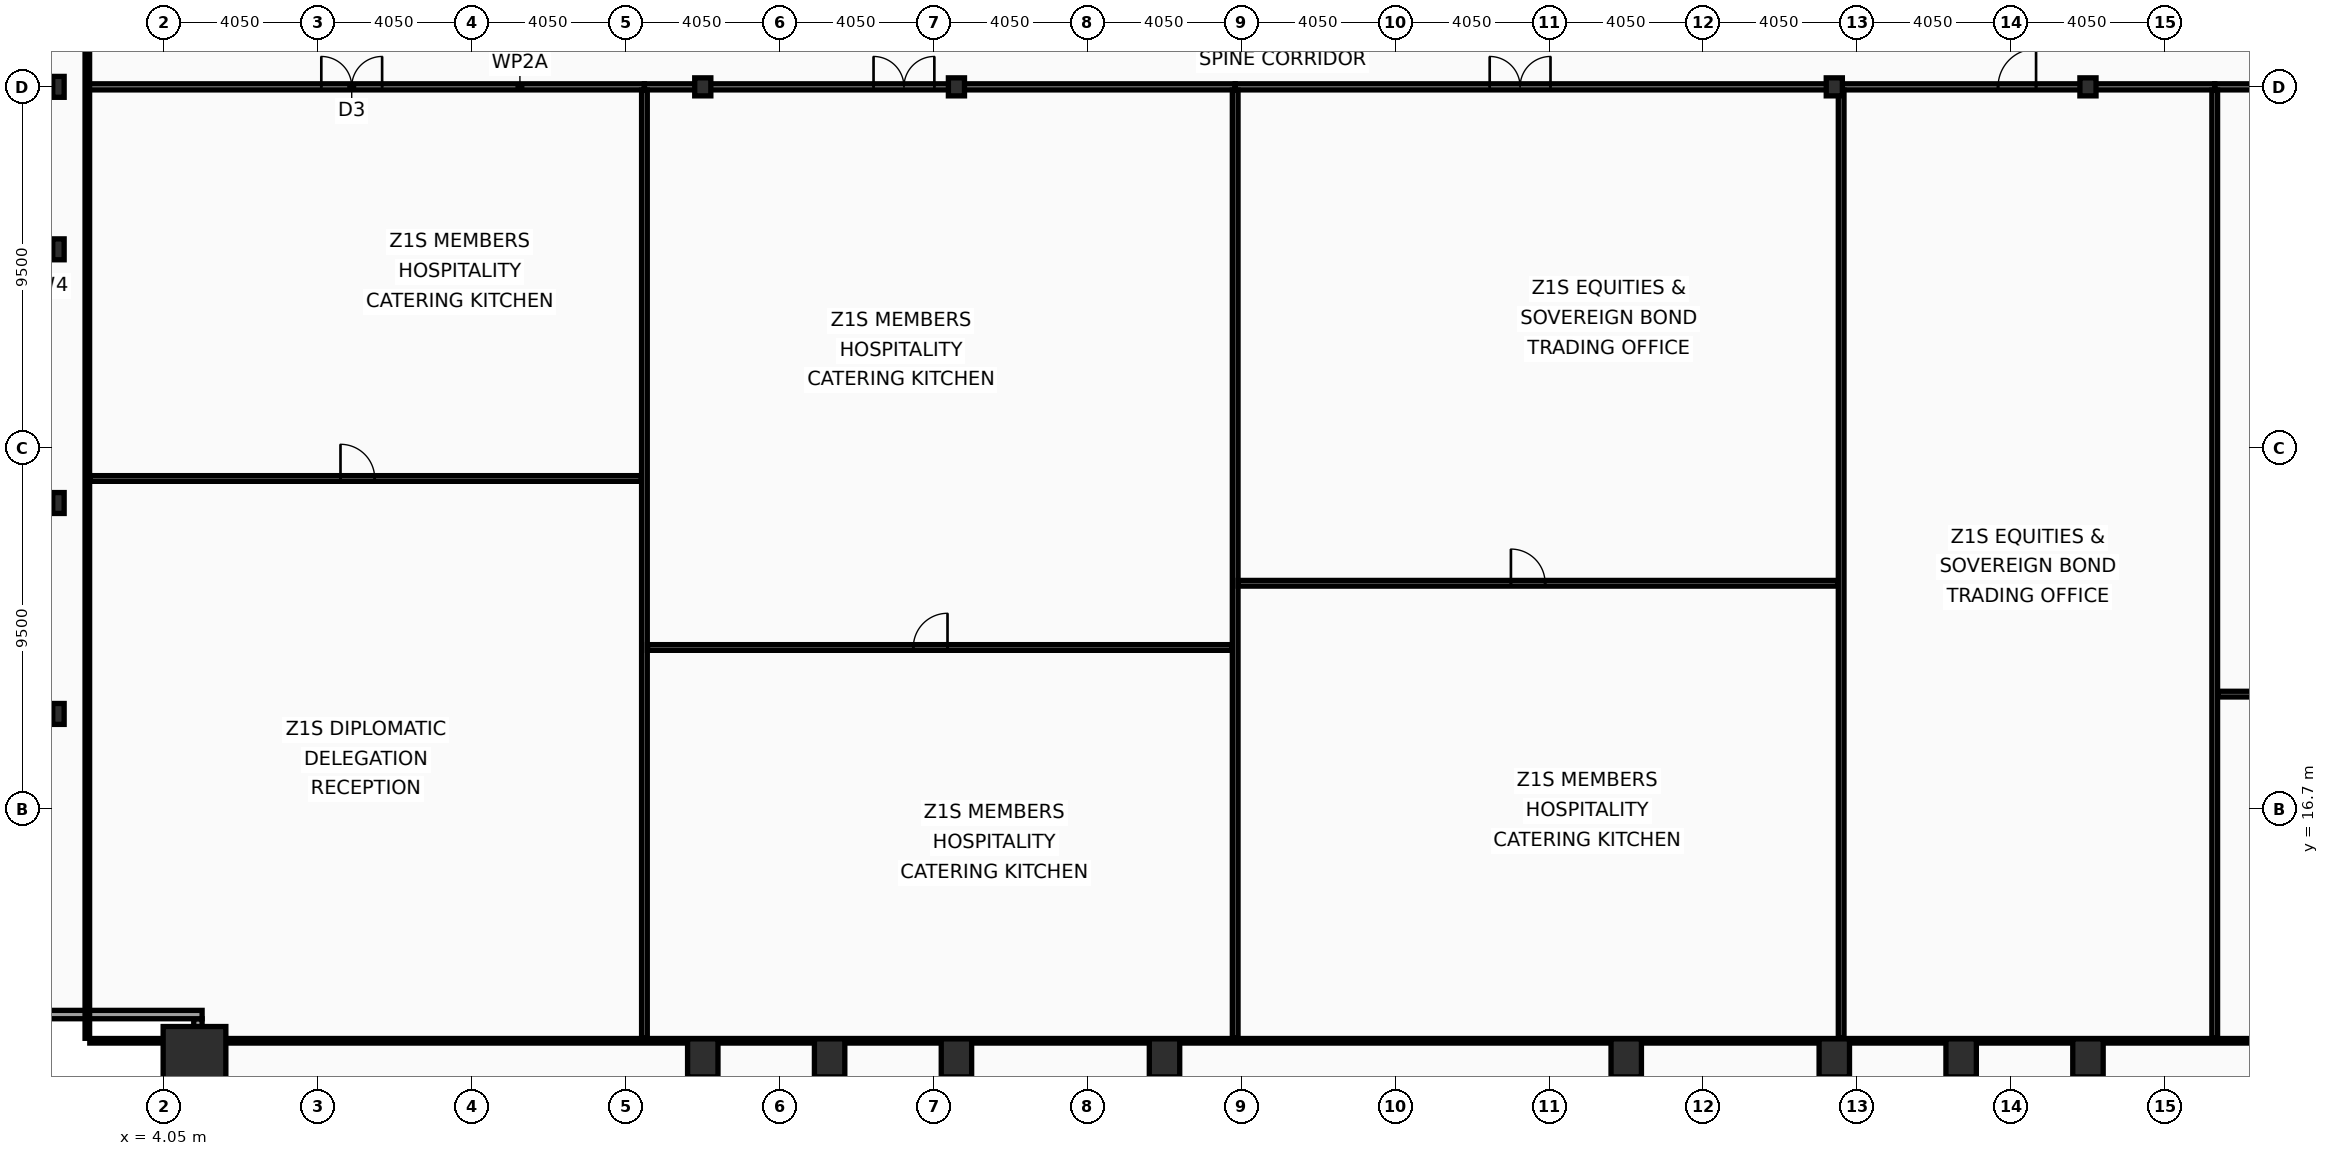
"""IFC4 building model, lengths in metres.
Left out: names, types, materials, properties, quantities, classifications, styles, units other than length and angle.
Written with IfcOpenShell. Run it as: python <this file> out.ifc"""

import sys

from ifc_helpers import new_model, si_unit, direction, frame, frame_2d, origin, origin_2d, place, context, subcontext, project, spatial, rectangle, hollow_rectangle, i_section, extrude, element, fill, save


model = new_model("IFC4")
c1 = context("Model", 3, precision=1e-05, world=origin(), true_north=direction((0.0, 1.0)))
c2 = subcontext(c1, "Body", "Model", "MODEL_VIEW")
j1 = project(units=[si_unit("LENGTHUNIT", "METRE"), si_unit("PLANEANGLEUNIT", "RADIAN")], contexts=[c1])
p1 = place(None, origin())
s1 = spatial("IfcSite", under=j1, at=p1, CompositionType="ELEMENT")
p2 = place(p1, origin())
s2 = spatial("IfcBuilding", under=s1, at=p2, CompositionType="ELEMENT")
p3 = place(p2, frame((0.0, 0.0, 77.8)))
s3 = spatial("IfcBuildingStorey", under=s2, at=p3, CompositionType="ELEMENT", Elevation=77.8)
p4 = place(p3, frame((4.85, 10.15, 0.0), z_axis=(0.0, 0.0, 1.0), x_axis=(1.0, 0.0, 0.0)))
e1 = element("IfcColumn", 1, at=p4, inside=s3, PredefinedType="COLUMN", context=c2, shape_type="SweptSolid", body=[
    extrude(hollow_rectangle(XDim=1.65, YDim=1.65, WallThickness=0.075, at=origin_2d()), origin(), (0.0, 0.0, 1.0), 4.0),
])
for number, where, z_axis, x_axis in (
    (2, (18.225, 10.15, 0.0), (0.0, 0.0, 1.0), (1.0, 0.0, 0.0)),
    (3, (21.562, 10.15, 0.0), (0.0, 0.0, 1.0), (1.0, 0.0, 0.0)),
    (4, (24.9, 10.15, 0.0), (0.0, 0.0, 1.0), (1.0, 0.0, 0.0)),
    (5, (30.375, 10.15, 0.0), (0.0, 0.0, 1.0), (1.0, 0.0, 0.0)),
    (6, (42.525, 10.15, 0.0), (0.0, 0.0, 1.0), (1.0, 0.0, 0.0)),
    (7, (48.0, 10.15, 0.0), (0.0, 0.0, 1.0), (1.0, 0.0, 0.0)),
    (8, (51.337, 10.15, 0.0), (0.0, 0.0, 1.0), (1.0, 0.0, 0.0)),
    (9, (54.675, 10.15, 0.0), (0.0, 0.0, 1.0), (1.0, 0.0, 0.0)),
):
    element("IfcColumn", number, at=place(p3, frame(where, z_axis=z_axis, x_axis=x_axis)), inside=s3, PredefinedType="COLUMN", context=c2, shape_type="SweptSolid", body=[
        extrude(hollow_rectangle(XDim=0.8, YDim=1.0, WallThickness=0.055, at=origin_2d()), origin(), (0.0, 0.0, 1.0), 4.0),
    ])
for number, where, z_axis, x_axis in (
    (10, (1.27, 19.2, 0.0), (0.0, 0.0, 1.0), (1.0, 0.0, 0.0)),
    (11, (1.27, 24.75, 0.0), (0.0, 0.0, 1.0), (1.0, 0.0, 0.0)),
    (12, (1.27, 31.425, 0.0), (0.0, 0.0, 1.0), (1.0, 0.0, 0.0)),
    (13, (1.27, 35.7, 0.0), (0.0, 0.0, 1.0), (1.0, 0.0, 0.0)),
):
    element("IfcColumn", number, at=place(p3, frame(where, z_axis=z_axis, x_axis=x_axis)), inside=s3, PredefinedType="COLUMN", context=c2, shape_type="SweptSolid", body=[
        extrude(i_section(OverallWidth=0.3, OverallDepth=0.55, WebThickness=0.015, FlangeThickness=0.029, at=origin_2d()), origin(), (0.0, 0.0, 1.0), 4.0),
    ])
for number, where, z_axis, x_axis in (
    (14, (18.225, 35.7, 0.0), (0.0, 0.0, 1.0), (1.0, 0.0, 0.0)),
    (15, (24.9, 35.7, 0.0), (0.0, 0.0, 1.0), (1.0, 0.0, 0.0)),
    (16, (48.0, 35.7, 0.0), (0.0, 0.0, 1.0), (1.0, 0.0, 0.0)),
    (17, (54.675, 35.7, 0.0), (0.0, 0.0, 1.0), (1.0, 0.0, 0.0)),
):
    element("IfcColumn", number, at=place(p3, frame(where, z_axis=z_axis, x_axis=x_axis)), inside=s3, PredefinedType="COLUMN", context=c2, shape_type="SweptSolid", body=[
        extrude(i_section(OverallWidth=0.424, OverallDepth=0.474, WebThickness=0.048, FlangeThickness=0.077, at=origin_2d()), origin(), (0.0, 0.0, 1.0), 4.0),
    ])
p5 = place(p3, frame((4.94, 7.27, 0.0), z_axis=(0.0, 0.0, 1.0), x_axis=(0.0, 1.0, 0.0)))
e18 = element("IfcWall", 18, at=p5, inside=s3, PredefinedType="SOLIDWALL", context=c2, shape_type="SweptSolid", body=[
    extrude(rectangle(XDim=3.91, YDim=0.22, at=frame_2d((1.955, 0.0))), origin(), (0.0, 0.0, 1.0), 2.47),
])
p6 = place(p3, frame((5.05, 11.29, 0.0), z_axis=(0.0, 0.0, 1.0), x_axis=(-1.0, 0.0, 0.0)))
e19 = element("IfcWall", 19, at=p6, inside=s3, PredefinedType="SOLIDWALL", context=c2, shape_type="SweptSolid", body=[
    extrude(rectangle(XDim=4.13, YDim=0.22, at=frame_2d((2.065, 0.0))), origin(), (0.0, 0.0, 1.0), 3.16),
])
p7 = place(p3, frame((2.03, 35.7, 0.0), z_axis=(0.0, 0.0, 1.0), x_axis=(1.0, 0.0, 0.0)))
e20 = element("IfcWall", 20, at=p7, inside=s3, PredefinedType="PARTITIONING", context=c2, shape_type="SweptSolid", body=[
    extrude(rectangle(XDim=14.66, YDim=0.16, at=frame_2d((7.33, 0.0))), origin(), (0.0, 0.0, 1.0), 2.21),
])
p8 = place(p7, frame((6.157, 0.0, 0.0)))
e21 = element("IfcOpeningElement", 21, at=p8, cuts=e20, PredefinedType="OPENING", context=c2, shape_type="SweptSolid", body=[
    extrude(rectangle(XDim=1.6, YDim=2.15, at=frame_2d((0.8, 1.075))), frame((0.0, 0.09, 0.0), z_axis=(0.0, -1.0, 0.0), x_axis=(1.0, 0.0, 0.0)), (0.0, 0.0, 1.0), 0.18),
])
p9 = place(p3, frame((2.095, 25.395, 0.0), z_axis=(0.0, 0.0, 1.0), x_axis=(1.0, 0.0, 0.0)))
e22 = element("IfcWall", 22, at=p9, inside=s3, PredefinedType="PARTITIONING", context=c2, shape_type="SweptSolid", body=[
    extrude(rectangle(XDim=14.515, YDim=0.15, at=frame_2d((7.257, 0.0))), origin(), (0.0, 0.0, 1.0), 3.16),
])
p10 = place(p9, frame((6.597, 0.0, 0.0)))
e23 = element("IfcOpeningElement", 23, at=p10, cuts=e22, PredefinedType="OPENING", context=c2, shape_type="SweptSolid", body=[
    extrude(rectangle(XDim=0.9, YDim=2.05, at=frame_2d((0.45, 1.025))), frame((0.0, 0.085, 0.0), z_axis=(0.0, -1.0, 0.0), x_axis=(1.0, 0.0, 0.0)), (0.0, 0.0, 1.0), 0.17),
])
p11 = place(p3, frame((16.69, 35.7, 0.0), z_axis=(0.0, 0.0, 1.0), x_axis=(1.0, 0.0, 0.0)))
e24 = element("IfcWall", 24, at=p11, inside=s3, PredefinedType="PARTITIONING", context=c2, shape_type="SweptSolid", body=[
    extrude(rectangle(XDim=15.545, YDim=0.16, at=frame_2d((7.773, 0.0))), origin(), (0.0, 0.0, 1.0), 2.21),
])
p12 = place(p11, frame((6.029, 0.0, 0.0)))
e25 = element("IfcOpeningElement", 25, at=p12, cuts=e24, PredefinedType="OPENING", context=c2, shape_type="SweptSolid", body=[
    extrude(rectangle(XDim=1.6, YDim=2.15, at=frame_2d((0.8, 1.075))), frame((0.0, 0.09, 0.0), z_axis=(0.0, -1.0, 0.0), x_axis=(1.0, 0.0, 0.0)), (0.0, 0.0, 1.0), 0.18),
])
p13 = place(p3, frame((16.69, 10.665, 0.0), z_axis=(0.0, 0.0, 1.0), x_axis=(0.0, 1.0, 0.0)))
e26 = element("IfcWall", 26, at=p13, inside=s3, PredefinedType="PARTITIONING", context=c2, shape_type="SweptSolid", body=[
    extrude(rectangle(XDim=24.95, YDim=0.15, at=frame_2d((12.475, 0.0))), origin(), (0.0, 0.0, 1.0), 2.21),
])
p14 = place(p3, frame((16.77, 20.948, 0.0), z_axis=(0.0, 0.0, 1.0), x_axis=(1.0, 0.0, 0.0)))
e27 = element("IfcWall", 27, at=p14, inside=s3, PredefinedType="PARTITIONING", context=c2, shape_type="SweptSolid", body=[
    extrude(rectangle(XDim=15.385, YDim=0.15, at=frame_2d((7.693, 0.0))), origin(), (0.0, 0.0, 1.0), 2.91),
])
p15 = place(p14, frame((6.995, 0.0, 0.0)))
e28 = element("IfcOpeningElement", 28, at=p15, cuts=e27, PredefinedType="OPENING", context=c2, shape_type="SweptSolid", body=[
    extrude(rectangle(XDim=0.9, YDim=2.05, at=frame_2d((0.45, 1.025))), frame((0.0, 0.085, 0.0), z_axis=(0.0, -1.0, 0.0), x_axis=(1.0, 0.0, 0.0)), (0.0, 0.0, 1.0), 0.17),
])
p16 = place(p3, frame((32.235, 35.7, 0.0), z_axis=(0.0, 0.0, 1.0), x_axis=(1.0, 0.0, 0.0)))
e29 = element("IfcWall", 29, at=p16, inside=s3, PredefinedType="PARTITIONING", context=c2, shape_type="SweptSolid", body=[
    extrude(rectangle(XDim=15.945, YDim=0.16, at=frame_2d((7.973, 0.0))), origin(), (0.0, 0.0, 1.0), 3.01),
])
p17 = place(p16, frame((6.697, 0.0, 0.0)))
e30 = element("IfcOpeningElement", 30, at=p17, cuts=e29, PredefinedType="OPENING", context=c2, shape_type="SweptSolid", body=[
    extrude(rectangle(XDim=1.6, YDim=2.15, at=frame_2d((0.8, 1.075))), frame((0.0, 0.09, 0.0), z_axis=(0.0, -1.0, 0.0), x_axis=(1.0, 0.0, 0.0)), (0.0, 0.0, 1.0), 0.18),
])
p18 = place(p3, frame((32.235, 10.665, 0.0), z_axis=(0.0, 0.0, 1.0), x_axis=(0.0, 1.0, 0.0)))
e31 = element("IfcWall", 31, at=p18, inside=s3, PredefinedType="PARTITIONING", context=c2, shape_type="SweptSolid", body=[
    extrude(rectangle(XDim=24.95, YDim=0.15, at=frame_2d((12.475, 0.0))), origin(), (0.0, 0.0, 1.0), 3.26),
])
p19 = place(p3, frame((32.315, 22.638, 0.0), z_axis=(0.0, 0.0, 1.0), x_axis=(1.0, 0.0, 0.0)))
e32 = element("IfcWall", 32, at=p19, inside=s3, PredefinedType="PARTITIONING", context=c2, shape_type="SweptSolid", body=[
    extrude(rectangle(XDim=15.786, YDim=0.15, at=frame_2d((7.893, 0.0))), origin(), (0.0, 0.0, 1.0), 3.01),
])
p20 = place(p19, frame((7.176, 0.0, 0.0)))
e33 = element("IfcOpeningElement", 33, at=p20, cuts=e32, PredefinedType="OPENING", context=c2, shape_type="SweptSolid", body=[
    extrude(rectangle(XDim=0.9, YDim=2.05, at=frame_2d((0.45, 1.025))), frame((0.0, 0.085, 0.0), z_axis=(0.0, -1.0, 0.0), x_axis=(1.0, 0.0, 0.0)), (0.0, 0.0, 1.0), 0.17),
])
p21 = place(p3, frame((48.18, 35.7, 0.0), z_axis=(0.0, 0.0, 1.0), x_axis=(1.0, 0.0, 0.0)))
e34 = element("IfcWall", 34, at=p21, inside=s3, PredefinedType="PARTITIONING", context=c2, shape_type="SweptSolid", body=[
    extrude(rectangle(XDim=9.83, YDim=0.16, at=frame_2d((4.915, 0.0))), origin(), (0.0, 0.0, 1.0), 2.21),
])
p22 = place(p21, frame((4.129, 0.0, 0.0)))
e35 = element("IfcOpeningElement", 35, at=p22, cuts=e34, PredefinedType="OPENING", context=c2, shape_type="SweptSolid", body=[
    extrude(rectangle(XDim=1.0, YDim=2.05, at=frame_2d((0.5, 1.025))), frame((0.0, 0.09, 0.0), z_axis=(0.0, -1.0, 0.0), x_axis=(1.0, 0.0, 0.0)), (0.0, 0.0, 1.0), 0.18),
])
p23 = place(p3, frame((48.18, 10.665, 0.0), z_axis=(0.0, 0.0, 1.0), x_axis=(0.0, 1.0, 0.0)))
e36 = element("IfcWall", 36, at=p23, inside=s3, PredefinedType="PARTITIONING", context=c2, shape_type="SweptSolid", body=[
    extrude(rectangle(XDim=24.95, YDim=0.15, at=frame_2d((12.475, 0.0))), origin(), (0.0, 0.0, 1.0), 3.01),
])
p24 = place(p3, frame((58.011, 35.7, 0.0), z_axis=(0.0, 0.0, 1.0), x_axis=(1.0, 0.0, 0.0)))
e37 = element("IfcWall", 37, at=p24, inside=s3, PredefinedType="PARTITIONING", context=c2, shape_type="SweptSolid", body=[
    extrude(rectangle(XDim=12.859, YDim=0.16, at=frame_2d((6.43, 0.0))), origin(), (0.0, 0.0, 1.0), 2.21),
])
p25 = place(p24, frame((5.401, 0.0, 0.0)))
e38 = element("IfcOpeningElement", 38, at=p25, cuts=e37, PredefinedType="OPENING", context=c2, shape_type="SweptSolid", body=[
    extrude(rectangle(XDim=1.0, YDim=2.05, at=frame_2d((0.5, 1.025))), frame((0.0, 0.09, 0.0), z_axis=(0.0, -1.0, 0.0), x_axis=(1.0, 0.0, 0.0)), (0.0, 0.0, 1.0), 0.18),
])
p26 = place(p3, frame((58.011, 10.665, 0.0), z_axis=(0.0, 0.0, 1.0), x_axis=(0.0, 1.0, 0.0)))
e39 = element("IfcWall", 39, at=p26, inside=s3, PredefinedType="PARTITIONING", context=c2, shape_type="SweptSolid", body=[
    extrude(rectangle(XDim=24.95, YDim=0.15, at=frame_2d((12.475, 0.0))), origin(), (0.0, 0.0, 1.0), 2.21),
])
p27 = place(p3, frame((58.091, 19.721, 0.0), z_axis=(0.0, 0.0, 1.0), x_axis=(1.0, 0.0, 0.0)))
e40 = element("IfcWall", 40, at=p27, inside=s3, PredefinedType="PARTITIONING", context=c2, shape_type="SweptSolid", body=[
    extrude(rectangle(XDim=12.714, YDim=0.15, at=frame_2d((6.357, 0.0))), origin(), (0.0, 0.0, 1.0), 2.21),
])
p28 = place(p27, frame((5.787, 0.0, 0.0)))
e41 = element("IfcOpeningElement", 41, at=p28, cuts=e40, PredefinedType="OPENING", context=c2, shape_type="SweptSolid", body=[
    extrude(rectangle(XDim=0.9, YDim=2.05, at=frame_2d((0.45, 1.025))), frame((0.0, 0.085, 0.0), z_axis=(0.0, -1.0, 0.0), x_axis=(1.0, 0.0, 0.0)), (0.0, 0.0, 1.0), 0.17),
])
p29 = place(p3, frame((2.03, 10.665, 0.0), z_axis=(0.0, 0.0, 1.0), x_axis=(0.0, 1.0, 0.0)))
e42 = element("IfcWall", 42, at=p29, inside=s3, PredefinedType="PARTITIONING", context=c2, shape_type="SweptSolid", body=[
    extrude(rectangle(XDim=42.11, YDim=0.12, at=frame_2d((21.055, 0.0))), origin(), (0.0, 0.0, 1.0), 2.21),
])
p30 = place(p3, frame((2.095, 10.6, 0.0), z_axis=(0.0, 0.0, 1.0), x_axis=(1.0, 0.0, 0.0)))
e43 = element("IfcWall", 43, at=p30, inside=s3, PredefinedType="PARTITIONING", context=c2, shape_type="SweptSolid", body=[
    extrude(rectangle(XDim=68.71, YDim=0.12, at=frame_2d((34.355, 0.0))), origin(), (0.0, 0.0, 1.0), 2.47),
])
p31 = place(p8, origin())
e44 = element("IfcDoor", 44, at=p31, inside=s3, OperationType="DOUBLE_DOOR_SINGLE_SWING", PredefinedType="DOOR", context=c2, shape_type="SweptSolid", body=[
    extrude(rectangle(XDim=1.6, YDim=2.15, at=frame_2d((0.8, 1.075))), frame((0.0, 0.025, 0.0), z_axis=(0.0, -1.0, 0.0), x_axis=(1.0, 0.0, 0.0)), (0.0, 0.0, 1.0), 0.05),
])
fill(e21, e44)
p32 = place(p10, origin())
e45 = element("IfcDoor", 45, at=p32, inside=s3, OperationType="SINGLE_SWING_LEFT", PredefinedType="DOOR", context=c2, shape_type="SweptSolid", body=[
    extrude(rectangle(XDim=0.9, YDim=2.05, at=frame_2d((0.45, 1.025))), frame((0.0, 0.025, 0.0), z_axis=(0.0, -1.0, 0.0), x_axis=(1.0, 0.0, 0.0)), (0.0, 0.0, 1.0), 0.05),
])
fill(e23, e45)
p33 = place(p12, origin())
e46 = element("IfcDoor", 46, at=p33, inside=s3, OperationType="DOUBLE_DOOR_SINGLE_SWING", PredefinedType="DOOR", context=c2, shape_type="SweptSolid", body=[
    extrude(rectangle(XDim=1.6, YDim=2.15, at=frame_2d((0.8, 1.075))), frame((0.0, 0.025, 0.0), z_axis=(0.0, -1.0, 0.0), x_axis=(1.0, 0.0, 0.0)), (0.0, 0.0, 1.0), 0.05),
])
fill(e25, e46)
p34 = place(p15, origin())
e47 = element("IfcDoor", 47, at=p34, inside=s3, OperationType="SINGLE_SWING_RIGHT", PredefinedType="DOOR", context=c2, shape_type="SweptSolid", body=[
    extrude(rectangle(XDim=0.9, YDim=2.05, at=frame_2d((0.45, 1.025))), frame((0.0, 0.025, 0.0), z_axis=(0.0, -1.0, 0.0), x_axis=(1.0, 0.0, 0.0)), (0.0, 0.0, 1.0), 0.05),
])
fill(e28, e47)
p35 = place(p17, origin())
e48 = element("IfcDoor", 48, at=p35, inside=s3, OperationType="DOUBLE_DOOR_SINGLE_SWING", PredefinedType="DOOR", context=c2, shape_type="SweptSolid", body=[
    extrude(rectangle(XDim=1.6, YDim=2.15, at=frame_2d((0.8, 1.075))), frame((0.0, 0.025, 0.0), z_axis=(0.0, -1.0, 0.0), x_axis=(1.0, 0.0, 0.0)), (0.0, 0.0, 1.0), 0.05),
])
fill(e30, e48)
p36 = place(p20, origin())
e49 = element("IfcDoor", 49, at=p36, inside=s3, OperationType="SINGLE_SWING_LEFT", PredefinedType="DOOR", context=c2, shape_type="SweptSolid", body=[
    extrude(rectangle(XDim=0.9, YDim=2.05, at=frame_2d((0.45, 1.025))), frame((0.0, 0.025, 0.0), z_axis=(0.0, -1.0, 0.0), x_axis=(1.0, 0.0, 0.0)), (0.0, 0.0, 1.0), 0.05),
])
fill(e33, e49)
p37 = place(p22, origin())
e50 = element("IfcDoor", 50, at=p37, inside=s3, OperationType="SINGLE_SWING_RIGHT", PredefinedType="DOOR", context=c2, shape_type="SweptSolid", body=[
    extrude(rectangle(XDim=1.0, YDim=2.05, at=frame_2d((0.5, 1.025))), frame((0.0, 0.025, 0.0), z_axis=(0.0, -1.0, 0.0), x_axis=(1.0, 0.0, 0.0)), (0.0, 0.0, 1.0), 0.05),
])
fill(e35, e50)
save(model, sys.argv[1])
